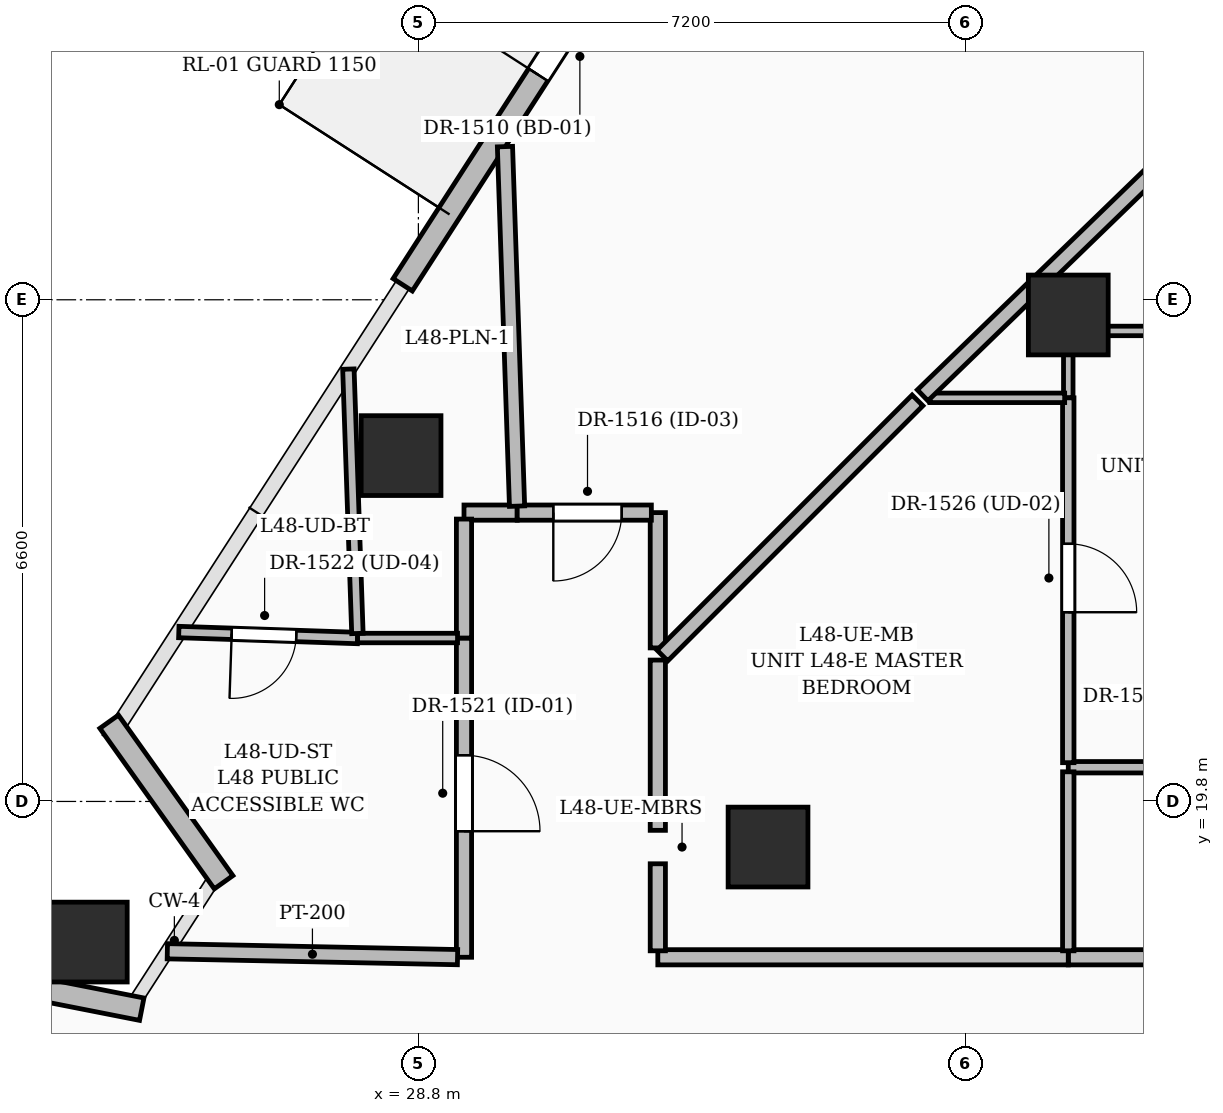
"""IFC4 building model, lengths in metres.
Left out: names, types, materials, properties, quantities, classifications, styles, units other than length and angle.
Written with IfcOpenShell. Run it as: python <this file> out.ifc"""

import sys

from ifc_helpers import new_model, si_unit, direction, frame, frame_2d, origin, origin_2d, place, context, subcontext, project, spatial, rectangle, extrude, element, fill, save


model = new_model("IFC4")
c1 = context("Model", 3, precision=1e-05, world=origin(), true_north=direction((0.0, 1.0)))
c2 = subcontext(c1, "Body", "Model", "MODEL_VIEW")
j1 = project(units=[si_unit("LENGTHUNIT", "METRE"), si_unit("PLANEANGLEUNIT", "RADIAN")], contexts=[c1])
p1 = place(None, origin())
s1 = spatial("IfcSite", under=j1, at=p1, CompositionType="ELEMENT")
p2 = place(p1, origin())
s2 = spatial("IfcBuilding", under=s1, at=p2, CompositionType="ELEMENT")
p3 = place(p2, frame((0.0, 0.0, 186.0)))
s3 = spatial("IfcBuildingStorey", under=s2, at=p3, CompositionType="ELEMENT", Elevation=186.0)
for number, where, z_axis, x_axis in (
    (1, (37.35, 26.2, 0.0), (0.0, 0.0, 1.0), (1.0, 0.0, 0.0)),
    (2, (33.4, 19.2, 0.0), (0.0, 0.0, 1.0), (1.0, 0.0, 0.0)),
    (3, (28.572, 24.35, 0.0), (0.0, 0.0, 1.0), (1.0, 0.0, 0.0)),
    (4, (24.444, 17.95, 0.0), (0.0, 0.0, 1.0), (1.0, 0.0, 0.0)),
):
    element("IfcColumn", number, at=place(p3, frame(where, z_axis=z_axis, x_axis=x_axis)), inside=s3, PredefinedType="COLUMN", context=c2, shape_type="SweptSolid", body=[
        extrude(rectangle(XDim=1.05, YDim=1.05, at=origin_2d()), origin(), (0.0, 0.0, 1.0), 3.6),
    ])
p4 = place(p3, frame((22.615, 17.568, 0.0), z_axis=(0.0, 0.0, 1.0), x_axis=(0.981152058632, -0.193237257902, 0.0)))
e5 = element("IfcWall", 5, at=p4, inside=s3, PredefinedType="SOLIDWALL", context=c2, shape_type="SweptSolid", body=[
    extrude(rectangle(XDim=2.594, YDim=0.3, at=frame_2d((1.297, 0.0))), origin(), (0.0, 0.0, 1.0), 2.469),
])
p5 = place(p3, frame((26.237, 18.737, 0.0), z_axis=(0.0, 0.0, 1.0), x_axis=(-0.580472212384, 0.814280056645, 0.0)))
e6 = element("IfcWall", 6, at=p5, inside=s3, PredefinedType="SOLIDWALL", context=c2, shape_type="SweptSolid", body=[
    extrude(rectangle(XDim=2.594, YDim=0.3, at=frame_2d((1.297, 0.0))), origin(), (0.0, 0.0, 1.0), 2.575),
])
p6 = place(p3, frame((28.594, 26.597, 0.0), z_axis=(0.0, 0.0, 1.0), x_axis=(0.542031523986, 0.840358154006, 0.0)))
e7 = element("IfcWall", 7, at=p6, inside=s3, PredefinedType="SOLIDWALL", context=c2, shape_type="SweptSolid", body=[
    extrude(rectangle(XDim=7.116, YDim=0.3, at=frame_2d((3.558, 0.0))), origin(), (0.0, 0.0, 1.0), 3.35),
])
p7 = place(p6, frame((3.288, 0.0, 0.0)))
e8 = element("IfcOpeningElement", 8, at=p7, cuts=e7, PredefinedType="OPENING", context=c2, shape_type="SweptSolid", body=[
    extrude(rectangle(XDim=1.0, YDim=2.2, at=frame_2d((0.5, 1.1))), frame((0.0, 0.16, 0.0), z_axis=(0.0, -1.0, 0.0), x_axis=(1.0, 0.0, 0.0)), (0.0, 0.0, 1.0), 0.32),
])
p8 = place(p3, frame((29.4, 21.95, 0.0), z_axis=(0.0, 0.0, 1.0), x_axis=(0.0, -1.0, 0.0)))
e9 = element("IfcWall", 9, at=p8, inside=s3, PredefinedType="PARTITIONING", context=c2, shape_type="SweptSolid", body=[
    extrude(rectangle(XDim=4.2, YDim=0.2, at=frame_2d((2.1, 0.0))), origin(), (0.0, 0.0, 1.0), 2.709),
])
p9 = place(p8, frame((1.542, 0.0, 0.0)))
e10 = element("IfcOpeningElement", 10, at=p9, cuts=e9, PredefinedType="OPENING", context=c2, shape_type="SweptSolid", body=[
    extrude(rectangle(XDim=1.0, YDim=2.2, at=frame_2d((0.5, 1.1))), frame((0.0, 0.11, 0.0), z_axis=(0.0, -1.0, 0.0), x_axis=(1.0, 0.0, 0.0)), (0.0, 0.0, 1.0), 0.22),
])
p10 = place(p3, frame((29.315, 17.752, 0.0), z_axis=(0.0, 0.0, 1.0), x_axis=(-0.999794603853, 0.020266970803, 0.0)))
e11 = element("IfcWall", 11, at=p10, inside=s3, PredefinedType="PARTITIONING", context=c2, shape_type="SweptSolid", body=[
    extrude(rectangle(XDim=3.819, YDim=0.2, at=frame_2d((1.909, 0.0))), origin(), (0.0, 0.0, 1.0), 2.709),
])
p11 = place(p3, frame((30.1, 23.6, 0.0), z_axis=(0.0, 0.0, 1.0), x_axis=(-1.0, 0.0, 0.0)))
e12 = element("IfcWall", 12, at=p11, inside=s3, PredefinedType="PARTITIONING", context=c2, shape_type="SweptSolid", body=[
    extrude(rectangle(XDim=0.7, YDim=0.2, at=frame_2d((0.35, 0.0))), origin(), (0.0, 0.0, 1.0), 2.464),
])
p12 = place(p3, frame((29.4, 23.515, 0.0), z_axis=(0.0, 0.0, 1.0), x_axis=(0.0, -1.0, 0.0)))
e13 = element("IfcWall", 13, at=p12, inside=s3, PredefinedType="PARTITIONING", context=c2, shape_type="SweptSolid", body=[
    extrude(rectangle(XDim=1.565, YDim=0.2, at=frame_2d((0.782, 0.0))), origin(), (0.0, 0.0, 1.0), 2.464),
])
p13 = place(p3, frame((41.365, 17.75, 0.0), z_axis=(0.0, 0.0, 1.0), x_axis=(-1.0, 0.0, 0.0)))
e14 = element("IfcWall", 14, at=p13, inside=s3, PredefinedType="PARTITIONING", context=c2, shape_type="SweptSolid", body=[
    extrude(rectangle(XDim=4.015, YDim=0.2, at=frame_2d((2.007, 0.0))), origin(), (0.0, 0.0, 1.0), 3.35),
])
p14 = place(p3, frame((37.35, 17.75, 0.0), z_axis=(0.0, 0.0, 1.0), x_axis=(-1.0, 0.0, 0.0)))
e15 = element("IfcWall", 15, at=p14, inside=s3, PredefinedType="PARTITIONING", context=c2, shape_type="SweptSolid", body=[
    extrude(rectangle(XDim=5.4, YDim=0.2, at=frame_2d((2.7, 0.0))), origin(), (0.0, 0.0, 1.0), 2.436),
])
p15 = place(p3, frame((31.95, 17.835, 0.0), z_axis=(0.0, 0.0, 1.0), x_axis=(0.0, 1.0, 0.0)))
e16 = element("IfcWall", 16, at=p15, inside=s3, PredefinedType="PARTITIONING", context=c2, shape_type="SweptSolid", body=[
    extrude(rectangle(XDim=1.145, YDim=0.2, at=frame_2d((0.573, 0.0))), origin(), (0.0, 0.0, 1.0), 3.35),
])
p16 = place(p3, frame((31.95, 19.42, 0.0), z_axis=(0.0, 0.0, 1.0), x_axis=(0.0, 1.0, 0.0)))
e17 = element("IfcWall", 17, at=p16, inside=s3, PredefinedType="PARTITIONING", context=c2, shape_type="SweptSolid", body=[
    extrude(rectangle(XDim=2.24, YDim=0.2, at=frame_2d((1.12, 0.0))), origin(), (0.0, 0.0, 1.0), 2.464),
])
p17 = place(p3, frame((31.95, 21.82, 0.0), z_axis=(0.0, 0.0, 1.0), x_axis=(0.0, 1.0, 0.0)))
e18 = element("IfcWall", 18, at=p17, inside=s3, PredefinedType="PARTITIONING", context=c2, shape_type="SweptSolid", body=[
    extrude(rectangle(XDim=1.78, YDim=0.2, at=frame_2d((0.89, 0.0))), origin(), (0.0, 0.0, 1.0), 2.709),
])
p18 = place(p3, frame((31.865, 23.6, 0.0), z_axis=(0.0, 0.0, 1.0), x_axis=(-1.0, 0.0, 0.0)))
e19 = element("IfcWall", 19, at=p18, inside=s3, PredefinedType="PARTITIONING", context=c2, shape_type="SweptSolid", body=[
    extrude(rectangle(XDim=1.765, YDim=0.2, at=frame_2d((0.882, 0.0))), origin(), (0.0, 0.0, 1.0), 2.709),
])
p19 = place(p18, frame((0.39, 0.0, 0.0)))
e20 = element("IfcOpeningElement", 20, at=p19, cuts=e19, PredefinedType="OPENING", context=c2, shape_type="SweptSolid", body=[
    extrude(rectangle(XDim=0.9, YDim=2.1, at=frame_2d((0.45, 1.05))), frame((0.0, 0.11, 0.0), z_axis=(0.0, -1.0, 0.0), x_axis=(1.0, 0.0, 0.0)), (0.0, 0.0, 1.0), 0.22),
])
p20 = place(p3, frame((28.0, 21.95, 0.0), z_axis=(0.0, 0.0, 1.0), x_axis=(-0.999434960864, 0.033611887826, 0.0)))
e21 = element("IfcWall", 21, at=p20, inside=s3, PredefinedType="PARTITIONING", context=c2, shape_type="SweptSolid", body=[
    extrude(rectangle(XDim=2.353, YDim=0.15, at=frame_2d((1.177, 0.0))), origin(), (0.0, 0.0, 1.0), 2.57),
])
p21 = place(p20, frame((0.807, 0.0, 0.0)))
e22 = element("IfcOpeningElement", 22, at=p21, cuts=e21, PredefinedType="OPENING", context=c2, shape_type="SweptSolid", body=[
    extrude(rectangle(XDim=0.85, YDim=2.1, at=frame_2d((0.425, 1.05))), frame((0.0, 0.085, 0.0), z_axis=(0.0, -1.0, 0.0), x_axis=(1.0, 0.0, 0.0)), (0.0, 0.0, 1.0), 0.17),
])
p22 = place(p3, frame((29.315, 21.95, 0.0), z_axis=(0.0, 0.0, 1.0), x_axis=(-1.0, 0.0, 0.0)))
e23 = element("IfcWall", 23, at=p22, inside=s3, PredefinedType="PARTITIONING", context=c2, shape_type="SweptSolid", body=[
    extrude(rectangle(XDim=1.315, YDim=0.125, at=frame_2d((0.657, 0.0))), origin(), (0.0, 0.0, 1.0), 3.35),
])
p23 = place(p3, frame((27.998, 22.01, 0.0), z_axis=(0.0, 0.0, 1.0), x_axis=(-0.034165077287, 0.999416203338, 0.0)))
e24 = element("IfcWall", 24, at=p23, inside=s3, PredefinedType="PARTITIONING", context=c2, shape_type="SweptSolid", body=[
    extrude(rectangle(XDim=3.48, YDim=0.15, at=frame_2d((1.74, 0.0))), origin(), (0.0, 0.0, 1.0), 2.57),
])
p24 = place(p3, frame((30.098, 23.685, 0.0), z_axis=(0.0, 0.0, 1.0), x_axis=(-0.033582780866, 0.999435939332, 0.0)))
e25 = element("IfcWall", 25, at=p24, inside=s3, PredefinedType="PARTITIONING", context=c2, shape_type="SweptSolid", body=[
    extrude(rectangle(XDim=4.733, YDim=0.2, at=frame_2d((2.366, 0.0))), origin(), (0.0, 0.0, 1.0), 2.57),
])
p25 = place(p3, frame((37.35, 20.25, 0.0), z_axis=(0.0, 0.0, 1.0), x_axis=(1.0, 0.0, 0.0)))
e26 = element("IfcWall", 26, at=p25, inside=s3, PredefinedType="PARTITIONING", context=c2, shape_type="SweptSolid", body=[
    extrude(rectangle(XDim=4.015, YDim=0.15, at=frame_2d((2.007, 0.0))), origin(), (0.0, 0.0, 1.0), 3.35),
])
p26 = place(p25, frame((1.566, 0.0, 0.0)))
e27 = element("IfcOpeningElement", 27, at=p26, cuts=e26, PredefinedType="OPENING", context=c2, shape_type="SweptSolid", body=[
    extrude(rectangle(XDim=0.85, YDim=2.1, at=frame_2d((0.425, 1.05))), frame((0.0, 0.085, 0.0), z_axis=(0.0, -1.0, 0.0), x_axis=(1.0, 0.0, 0.0)), (0.0, 0.0, 1.0), 0.17),
])
p27 = place(p3, frame((42.75, 25.99, 0.0), z_axis=(0.0, 0.0, 1.0), x_axis=(-1.0, 0.0, 0.0)))
e28 = element("IfcWall", 28, at=p27, inside=s3, PredefinedType="PARTITIONING", context=c2, shape_type="SweptSolid", body=[
    extrude(rectangle(XDim=5.4, YDim=0.125, at=frame_2d((2.7, 0.0))), origin(), (0.0, 0.0, 1.0), 2.436),
])
p28 = place(p27, frame((2.165, 0.0, 0.0)))
e29 = element("IfcOpeningElement", 29, at=p28, cuts=e28, PredefinedType="OPENING", context=c2, shape_type="SweptSolid", body=[
    extrude(rectangle(XDim=0.95, YDim=2.2, at=frame_2d((0.475, 1.1))), frame((0.0, 0.072, 0.0), z_axis=(0.0, -1.0, 0.0), x_axis=(1.0, 0.0, 0.0)), (0.0, 0.0, 1.0), 0.145),
])
p29 = place(p3, frame((37.35, 25.942, 0.0), z_axis=(0.0, 0.0, 1.0), x_axis=(0.0, -1.0, 0.0)))
e30 = element("IfcWall", 30, at=p29, inside=s3, PredefinedType="PARTITIONING", context=c2, shape_type="SweptSolid", body=[
    extrude(rectangle(XDim=0.832, YDim=0.125, at=frame_2d((0.416, 0.0))), origin(), (0.0, 0.0, 1.0), 3.35),
])
p30 = place(p3, frame((37.35, 25.11, 0.0), z_axis=(0.0, 0.0, 1.0), x_axis=(0.0, -1.0, 0.0)))
e31 = element("IfcWall", 31, at=p30, inside=s3, PredefinedType="PARTITIONING", context=c2, shape_type="SweptSolid", body=[
    extrude(rectangle(XDim=4.8, YDim=0.15, at=frame_2d((2.4, 0.0))), origin(), (0.0, 0.0, 1.0), 3.35),
])
p31 = place(p30, frame((1.921, 0.0, 0.0)))
e32 = element("IfcOpeningElement", 32, at=p31, cuts=e31, PredefinedType="OPENING", context=c2, shape_type="SweptSolid", body=[
    extrude(rectangle(XDim=0.9, YDim=2.15, at=frame_2d((0.45, 1.075))), frame((0.0, 0.085, 0.0), z_axis=(0.0, -1.0, 0.0), x_axis=(1.0, 0.0, 0.0)), (0.0, 0.0, 1.0), 0.17),
])
p32 = place(p3, frame((37.35, 20.19, 0.0), z_axis=(0.0, 0.0, 1.0), x_axis=(0.0, -1.0, 0.0)))
e33 = element("IfcWall", 33, at=p32, inside=s3, PredefinedType="PARTITIONING", context=c2, shape_type="SweptSolid", body=[
    extrude(rectangle(XDim=2.355, YDim=0.15, at=frame_2d((1.177, 0.0))), origin(), (0.0, 0.0, 1.0), 3.35),
])
p33 = place(p3, frame((35.53, 25.11, 0.0), z_axis=(0.0, 0.0, 1.0), x_axis=(1.0, 0.0, 0.0)))
e34 = element("IfcWall", 34, at=p33, inside=s3, PredefinedType="PARTITIONING", context=c2, shape_type="SweptSolid", body=[
    extrude(rectangle(XDim=1.772, YDim=0.125, at=frame_2d((0.886, 0.0))), origin(), (0.0, 0.0, 1.0), 2.436),
])
p34 = place(p3, frame((43.187, 32.652, 0.0), z_axis=(0.0, 0.0, 1.0), x_axis=(-0.718315109046, -0.695717905559, 0.0)))
e35 = element("IfcWall", 35, at=p34, inside=s3, PredefinedType="PARTITIONING", context=c2, shape_type="SweptSolid", body=[
    extrude(rectangle(XDim=10.793, YDim=0.2, at=frame_2d((5.396, 0.0))), origin(), (0.0, 0.0, 1.0), 2.464),
])
p35 = place(p3, frame((35.366, 25.076, 0.0), z_axis=(0.0, 0.0, 1.0), x_axis=(-0.707132498369, -0.707081063069, 0.0)))
e36 = element("IfcWall", 36, at=p35, inside=s3, PredefinedType="PARTITIONING", context=c2, shape_type="SweptSolid", body=[
    extrude(rectangle(XDim=4.747, YDim=0.2, at=frame_2d((2.373, 0.0))), origin(), (0.0, 0.0, 1.0), 2.709),
])
p36 = place(p7, origin())
e37 = element("IfcDoor", 37, at=p36, inside=s3, OperationType="SINGLE_SWING_LEFT", PredefinedType="DOOR", context=c2, shape_type="SweptSolid", body=[
    extrude(rectangle(XDim=1.0, YDim=2.2, at=frame_2d((0.5, 1.1))), frame((0.0, 0.025, 0.0), z_axis=(0.0, -1.0, 0.0), x_axis=(1.0, 0.0, 0.0)), (0.0, 0.0, 1.0), 0.05),
])
fill(e8, e37)
p37 = place(p19, origin())
e38 = element("IfcDoor", 38, at=p37, inside=s3, OperationType="SINGLE_SWING_RIGHT", PredefinedType="DOOR", context=c2, shape_type="SweptSolid", body=[
    extrude(rectangle(XDim=0.9, YDim=2.1, at=frame_2d((0.45, 1.05))), frame((0.0, 0.025, 0.0), z_axis=(0.0, -1.0, 0.0), x_axis=(1.0, 0.0, 0.0)), (0.0, 0.0, 1.0), 0.05),
])
fill(e20, e38)
p38 = place(p9, origin())
e39 = element("IfcDoor", 39, at=p38, inside=s3, OperationType="SINGLE_SWING_RIGHT", PredefinedType="DOOR", context=c2, shape_type="SweptSolid", body=[
    extrude(rectangle(XDim=1.0, YDim=2.2, at=frame_2d((0.5, 1.1))), frame((0.0, 0.025, 0.0), z_axis=(0.0, -1.0, 0.0), x_axis=(1.0, 0.0, 0.0)), (0.0, 0.0, 1.0), 0.05),
])
fill(e10, e39)
p39 = place(p21, origin())
e40 = element("IfcDoor", 40, at=p39, inside=s3, OperationType="SINGLE_SWING_RIGHT", PredefinedType="DOOR", context=c2, shape_type="SweptSolid", body=[
    extrude(rectangle(XDim=0.85, YDim=2.1, at=frame_2d((0.425, 1.05))), frame((0.0, 0.025, 0.0), z_axis=(0.0, -1.0, 0.0), x_axis=(1.0, 0.0, 0.0)), (0.0, 0.0, 1.0), 0.05),
])
fill(e22, e40)
p40 = place(p31, origin())
e41 = element("IfcDoor", 41, at=p40, inside=s3, OperationType="SINGLE_SWING_RIGHT", PredefinedType="DOOR", context=c2, shape_type="SweptSolid", body=[
    extrude(rectangle(XDim=0.9, YDim=2.15, at=frame_2d((0.45, 1.075))), frame((0.0, 0.025, 0.0), z_axis=(0.0, -1.0, 0.0), x_axis=(1.0, 0.0, 0.0)), (0.0, 0.0, 1.0), 0.05),
])
fill(e32, e41)
save(model, sys.argv[1])
